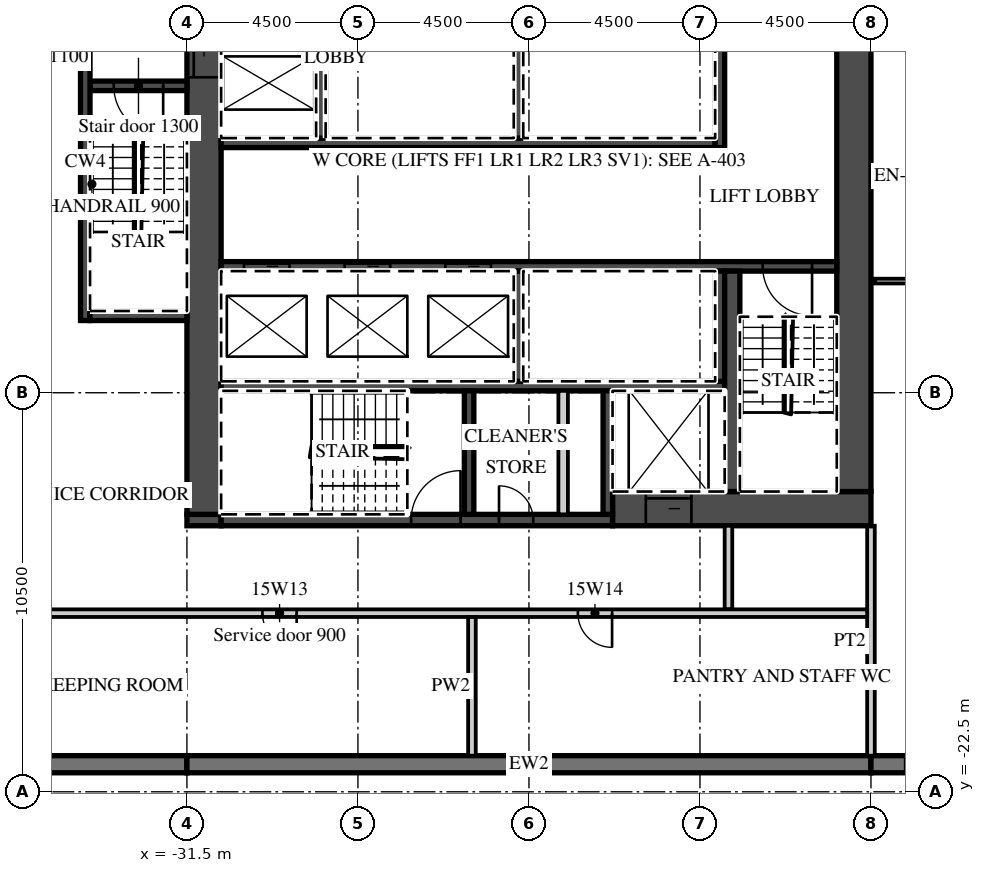
"""IFC4 building model, lengths in metres.
Left out: names, types, materials, properties, quantities, classifications, styles, units other than length and angle.
Written with IfcOpenShell. Run it as: python <this file> out.ifc"""

import sys

from ifc_helpers import new_model, si_unit, direction, frame, frame_2d, origin, place, context, subcontext, project, spatial, rectangle, extrude, element, fill, save


model = new_model("IFC4")
c1 = context("Model", 3, precision=1e-05, world=origin(), true_north=direction((0.0, 1.0)))
c2 = subcontext(c1, "Body", "Model", "MODEL_VIEW")
j1 = project(units=[si_unit("LENGTHUNIT", "METRE"), si_unit("PLANEANGLEUNIT", "RADIAN")], contexts=[c1])
p1 = place(None, origin())
s1 = spatial("IfcSite", under=j1, at=p1, CompositionType="ELEMENT")
p2 = place(p1, origin())
s2 = spatial("IfcBuilding", under=s1, at=p2, CompositionType="ELEMENT")
p3 = place(p2, frame((0.0, 0.0, 79.8)))
s3 = spatial("IfcBuildingStorey", under=s2, at=p3, CompositionType="ELEMENT", Elevation=79.8)
p4 = place(p3, frame((-41.0, -21.775, 0.0), z_axis=(0.0, 0.0, 1.0), x_axis=(1.0, 0.0, 0.0)))
e1 = element("IfcWall", 1, at=p4, inside=s3, PredefinedType="SOLIDWALL", context=c2, shape_type="SweptSolid", body=[
    extrude(rectangle(XDim=9.5, YDim=0.45, at=frame_2d((4.75, 0.0))), origin(), (0.0, 0.0, 1.0), 3.02),
])
p5 = place(p3, frame((-31.5, -21.775, 0.0), z_axis=(0.0, 0.0, 1.0), x_axis=(1.0, 0.0, 0.0)))
e2 = element("IfcWall", 2, at=p5, inside=s3, PredefinedType="SOLIDWALL", context=c2, shape_type="SweptSolid", body=[
    extrude(rectangle(XDim=18.0, YDim=0.45, at=frame_2d((9.0, 0.0))), origin(), (0.0, 0.0, 1.0), 3.02),
])
p6 = place(p3, frame((-13.5, -21.775, 0.0), z_axis=(0.0, 0.0, 1.0), x_axis=(1.0, 0.0, 0.0)))
e3 = element("IfcWall", 3, at=p6, inside=s3, PredefinedType="SOLIDWALL", context=c2, shape_type="SweptSolid", body=[
    extrude(rectangle(XDim=54.5, YDim=0.45, at=frame_2d((27.25, 0.0))), origin(), (0.0, 0.0, 1.0), 3.02),
])
p7 = place(p6, frame((0.9, 0.0, 0.45)))
e4 = element("IfcOpeningElement", 4, at=p7, cuts=e3, PredefinedType="OPENING", context=c2, shape_type="SweptSolid", body=[
    extrude(rectangle(XDim=2.7, YDim=2.25, at=frame_2d((1.35, 1.125))), frame((0.0, 0.235, 0.0), z_axis=(0.0, -1.0, 0.0), x_axis=(1.0, 0.0, 0.0)), (0.0, 0.0, 1.0), 0.47),
])
p8 = place(p6, frame((5.4, 0.0, 0.45)))
e5 = element("IfcOpeningElement", 5, at=p8, cuts=e3, PredefinedType="OPENING", context=c2, shape_type="SweptSolid", body=[
    extrude(rectangle(XDim=2.7, YDim=2.25, at=frame_2d((1.35, 1.125))), frame((0.0, 0.235, 0.0), z_axis=(0.0, -1.0, 0.0), x_axis=(1.0, 0.0, 0.0)), (0.0, 0.0, 1.0), 0.47),
])
p9 = place(p6, frame((9.9, 0.0, 0.45)))
e6 = element("IfcOpeningElement", 6, at=p9, cuts=e3, PredefinedType="OPENING", context=c2, shape_type="SweptSolid", body=[
    extrude(rectangle(XDim=2.7, YDim=2.25, at=frame_2d((1.35, 1.125))), frame((0.0, 0.235, 0.0), z_axis=(0.0, -1.0, 0.0), x_axis=(1.0, 0.0, 0.0)), (0.0, 0.0, 1.0), 0.47),
])
p10 = place(p6, frame((14.4, 0.0, 0.45)))
e7 = element("IfcOpeningElement", 7, at=p10, cuts=e3, PredefinedType="OPENING", context=c2, shape_type="SweptSolid", body=[
    extrude(rectangle(XDim=2.7, YDim=2.25, at=frame_2d((1.35, 1.125))), frame((0.0, 0.235, 0.0), z_axis=(0.0, -1.0, 0.0), x_axis=(1.0, 0.0, 0.0)), (0.0, 0.0, 1.0), 0.47),
])
p11 = place(p6, frame((18.9, 0.0, 0.45)))
e8 = element("IfcOpeningElement", 8, at=p11, cuts=e3, PredefinedType="OPENING", context=c2, shape_type="SweptSolid", body=[
    extrude(rectangle(XDim=2.7, YDim=2.25, at=frame_2d((1.35, 1.125))), frame((0.0, 0.235, 0.0), z_axis=(0.0, -1.0, 0.0), x_axis=(1.0, 0.0, 0.0)), (0.0, 0.0, 1.0), 0.47),
])
p12 = place(p6, frame((23.4, 0.0, 0.45)))
e9 = element("IfcOpeningElement", 9, at=p12, cuts=e3, PredefinedType="OPENING", context=c2, shape_type="SweptSolid", body=[
    extrude(rectangle(XDim=2.7, YDim=2.25, at=frame_2d((1.35, 1.125))), frame((0.0, 0.235, 0.0), z_axis=(0.0, -1.0, 0.0), x_axis=(1.0, 0.0, 0.0)), (0.0, 0.0, 1.0), 0.47),
])
p13 = place(p6, frame((27.9, 0.0, 0.45)))
e10 = element("IfcOpeningElement", 10, at=p13, cuts=e3, PredefinedType="OPENING", context=c2, shape_type="SweptSolid", body=[
    extrude(rectangle(XDim=2.7, YDim=2.25, at=frame_2d((1.35, 1.125))), frame((0.0, 0.235, 0.0), z_axis=(0.0, -1.0, 0.0), x_axis=(1.0, 0.0, 0.0)), (0.0, 0.0, 1.0), 0.47),
])
p14 = place(p6, frame((32.4, 0.0, 0.45)))
e11 = element("IfcOpeningElement", 11, at=p14, cuts=e3, PredefinedType="OPENING", context=c2, shape_type="SweptSolid", body=[
    extrude(rectangle(XDim=2.7, YDim=2.25, at=frame_2d((1.35, 1.125))), frame((0.0, 0.235, 0.0), z_axis=(0.0, -1.0, 0.0), x_axis=(1.0, 0.0, 0.0)), (0.0, 0.0, 1.0), 0.47),
])
p15 = place(p6, frame((36.9, 0.0, 0.45)))
e12 = element("IfcOpeningElement", 12, at=p15, cuts=e3, PredefinedType="OPENING", context=c2, shape_type="SweptSolid", body=[
    extrude(rectangle(XDim=2.7, YDim=2.25, at=frame_2d((1.35, 1.125))), frame((0.0, 0.235, 0.0), z_axis=(0.0, -1.0, 0.0), x_axis=(1.0, 0.0, 0.0)), (0.0, 0.0, 1.0), 0.47),
])
p16 = place(p6, frame((41.4, 0.0, 0.45)))
e13 = element("IfcOpeningElement", 13, at=p16, cuts=e3, PredefinedType="OPENING", context=c2, shape_type="SweptSolid", body=[
    extrude(rectangle(XDim=2.7, YDim=2.25, at=frame_2d((1.35, 1.125))), frame((0.0, 0.235, 0.0), z_axis=(0.0, -1.0, 0.0), x_axis=(1.0, 0.0, 0.0)), (0.0, 0.0, 1.0), 0.47),
])
p17 = place(p6, frame((45.9, 0.0, 0.45)))
e14 = element("IfcOpeningElement", 14, at=p17, cuts=e3, PredefinedType="OPENING", context=c2, shape_type="SweptSolid", body=[
    extrude(rectangle(XDim=2.7, YDim=2.25, at=frame_2d((1.35, 1.125))), frame((0.0, 0.235, 0.0), z_axis=(0.0, -1.0, 0.0), x_axis=(1.0, 0.0, 0.0)), (0.0, 0.0, 1.0), 0.47),
])
p18 = place(p6, frame((50.4, 0.0, 0.45)))
e15 = element("IfcOpeningElement", 15, at=p18, cuts=e3, PredefinedType="OPENING", context=c2, shape_type="SweptSolid", body=[
    extrude(rectangle(XDim=2.7, YDim=2.25, at=frame_2d((1.35, 1.125))), frame((0.0, 0.235, 0.0), z_axis=(0.0, -1.0, 0.0), x_axis=(1.0, 0.0, 0.0)), (0.0, 0.0, 1.0), 0.47),
])
p19 = place(p3, frame((-13.5, -21.55, 0.0), z_axis=(0.0, 0.0, 1.0), x_axis=(0.0, 1.0, 0.0)))
e16 = element("IfcWall", 16, at=p19, inside=s3, PredefinedType="PARTITIONING", context=c2, shape_type="SweptSolid", body=[
    extrude(rectangle(XDim=6.05, YDim=0.2, at=frame_2d((3.025, 0.0))), origin(), (0.0, 0.0, 1.0), 3.02),
])
p20 = place(p3, frame((-13.4, -9.062, 0.0), z_axis=(0.0, 0.0, 1.0), x_axis=(1.0, 0.0, 0.0)))
e17 = element("IfcWall", 17, at=p20, inside=s3, PredefinedType="PARTITIONING", context=c2, shape_type="SweptSolid", body=[
    extrude(rectangle(XDim=2.25, YDim=0.125, at=frame_2d((1.125, 0.0))), origin(), (0.0, 0.0, 1.0), 3.02),
])
p21 = place(p3, frame((-20.3, -15.05, 0.0), z_axis=(0.0, 0.0, 1.0), x_axis=(1.0, 0.0, 0.0)))
e18 = element("IfcWall", 18, at=p21, inside=s3, PredefinedType="SHEAR", context=c2, shape_type="SweptSolid", body=[
    extrude(rectangle(XDim=6.8, YDim=0.9, at=frame_2d((3.4, 0.0))), origin(), (0.0, 0.0, 1.0), 3.02),
])
p22 = place(p21, frame((0.875, 0.0, 0.0)))
e19 = element("IfcOpeningElement", 19, at=p22, cuts=e18, PredefinedType="OPENING", context=c2, shape_type="SweptSolid", body=[
    extrude(rectangle(XDim=1.2, YDim=2.1, at=frame_2d((0.6, 1.05))), frame((0.0, 0.46, 0.0), z_axis=(0.0, -1.0, 0.0), x_axis=(1.0, 0.0, 0.0)), (0.0, 0.0, 1.0), 0.92),
])
p23 = place(p3, frame((-31.5, -15.35, 0.0), z_axis=(0.0, 0.0, 1.0), x_axis=(1.0, 0.0, 0.0)))
e20 = element("IfcWall", 20, at=p23, inside=s3, PredefinedType="SHEAR", context=c2, shape_type="SweptSolid", body=[
    extrude(rectangle(XDim=0.9, YDim=0.3, at=frame_2d((0.45, 0.0))), origin(), (0.0, 0.0, 1.0), 3.02),
])
p24 = place(p3, frame((-30.6, -15.35, 0.0), z_axis=(0.0, 0.0, 1.0), x_axis=(1.0, 0.0, 0.0)))
e21 = element("IfcWall", 21, at=p24, inside=s3, PredefinedType="SHEAR", context=c2, shape_type="SweptSolid", body=[
    extrude(rectangle(XDim=10.3, YDim=0.3, at=frame_2d((5.15, 0.0))), origin(), (0.0, 0.0, 1.0), 3.02),
])
p25 = place(p24, frame((5.0, 0.0, 0.0)))
e22 = element("IfcOpeningElement", 22, at=p25, cuts=e21, PredefinedType="OPENING", context=c2, shape_type="SweptSolid", body=[
    extrude(rectangle(XDim=1.3, YDim=2.1, at=frame_2d((0.65, 1.05))), frame((0.0, 0.16, 0.0), z_axis=(0.0, -1.0, 0.0), x_axis=(1.0, 0.0, 0.0)), (0.0, 0.0, 1.0), 0.32),
])
p26 = place(p24, frame((7.312, 0.0, 0.0)))
e23 = element("IfcOpeningElement", 23, at=p26, cuts=e21, PredefinedType="OPENING", context=c2, shape_type="SweptSolid", body=[
    extrude(rectangle(XDim=0.9, YDim=2.1, at=frame_2d((0.45, 1.05))), frame((0.0, 0.16, 0.0), z_axis=(0.0, -1.0, 0.0), x_axis=(1.0, 0.0, 0.0)), (0.0, 0.0, 1.0), 0.32),
])
p27 = place(p3, frame((-31.05, -15.2, 0.0), z_axis=(0.0, 0.0, 1.0), x_axis=(0.0, 1.0, 0.0)))
e24 = element("IfcWall", 24, at=p27, inside=s3, PredefinedType="SHEAR", context=c2, shape_type="SweptSolid", body=[
    extrude(rectangle(XDim=12.8, YDim=0.9, at=frame_2d((6.4, 0.0))), origin(), (0.0, 0.0, 1.0), 3.02),
])
p28 = place(p27, frame((11.5, 0.0, 0.0)))
e25 = element("IfcOpeningElement", 25, at=p28, cuts=e24, PredefinedType="OPENING", context=c2, shape_type="SweptSolid", body=[
    extrude(rectangle(XDim=1.1, YDim=2.1, at=frame_2d((0.55, 1.05))), frame((0.0, 0.46, 0.0), z_axis=(0.0, -1.0, 0.0), x_axis=(1.0, 0.0, 0.0)), (0.0, 0.0, 1.0), 0.92),
])
p29 = place(p3, frame((-13.95, -14.6, 0.0), z_axis=(0.0, 0.0, 1.0), x_axis=(0.0, 1.0, 0.0)))
e26 = element("IfcWall", 26, at=p29, inside=s3, PredefinedType="SHEAR", context=c2, shape_type="SweptSolid", body=[
    extrude(rectangle(XDim=12.2, YDim=0.9, at=frame_2d((6.1, 0.0))), origin(), (0.0, 0.0, 1.0), 3.02),
])
p30 = place(p3, frame((-30.6, -5.425, 0.0), z_axis=(0.0, 0.0, 1.0), x_axis=(1.0, 0.0, 0.0)))
e27 = element("IfcWall", 27, at=p30, inside=s3, PredefinedType="SHEAR", context=c2, shape_type="SweptSolid", body=[
    extrude(rectangle(XDim=13.0, YDim=0.25, at=frame_2d((6.5, 0.0))), origin(), (0.0, 0.0, 1.0), 3.02),
])
p31 = place(p3, frame((-17.475, -5.55, 0.0), z_axis=(0.0, 0.0, 1.0), x_axis=(0.0, 1.0, 0.0)))
e28 = element("IfcWall", 28, at=p31, inside=s3, PredefinedType="SHEAR", context=c2, shape_type="SweptSolid", body=[
    extrude(rectangle(XDim=3.15, YDim=0.25, at=frame_2d((1.575, 0.0))), origin(), (0.0, 0.0, 1.0), 3.02),
])
for number, where, z_axis, x_axis in (
    (29, (-27.975, -5.3, 0.0), (0.0, 0.0, 1.0), (0.0, 1.0, 0.0)),
    (30, (-22.775, -5.3, 0.0), (0.0, 0.0, 1.0), (0.0, 1.0, 0.0)),
):
    element("IfcWall", number, at=place(p3, frame(where, z_axis=z_axis, x_axis=x_axis)), inside=s3, PredefinedType="SHEAR", context=c2, shape_type="SweptSolid", body=[
        extrude(rectangle(XDim=2.9, YDim=0.25, at=frame_2d((1.45, 0.0))), origin(), (0.0, 0.0, 1.0), 3.02),
    ])
p32 = place(p3, frame((-30.6, -8.675, 0.0), z_axis=(0.0, 0.0, 1.0), x_axis=(1.0, 0.0, 0.0)))
e31 = element("IfcWall", 31, at=p32, inside=s3, PredefinedType="SHEAR", context=c2, shape_type="SweptSolid", body=[
    extrude(rectangle(XDim=16.2, YDim=0.25, at=frame_2d((8.1, 0.0))), origin(), (0.0, 0.0, 1.0), 3.02),
])
p33 = place(p32, frame((0.6, 0.0, 0.0)))
e32 = element("IfcOpeningElement", 32, at=p33, cuts=e31, PredefinedType="OPENING", context=c2, shape_type="SweptSolid", body=[
    extrude(rectangle(XDim=1.2, YDim=2.1, at=frame_2d((0.6, 1.05))), frame((0.0, 0.135, 0.0), z_axis=(0.0, -1.0, 0.0), x_axis=(1.0, 0.0, 0.0)), (0.0, 0.0, 1.0), 0.27),
])
p34 = place(p32, frame((3.25, 0.0, 0.0)))
e33 = element("IfcOpeningElement", 33, at=p34, cuts=e31, PredefinedType="OPENING", context=c2, shape_type="SweptSolid", body=[
    extrude(rectangle(XDim=1.2, YDim=2.1, at=frame_2d((0.6, 1.05))), frame((0.0, 0.135, 0.0), z_axis=(0.0, -1.0, 0.0), x_axis=(1.0, 0.0, 0.0)), (0.0, 0.0, 1.0), 0.27),
])
p35 = place(p32, frame((5.9, 0.0, 0.0)))
e34 = element("IfcOpeningElement", 34, at=p35, cuts=e31, PredefinedType="OPENING", context=c2, shape_type="SweptSolid", body=[
    extrude(rectangle(XDim=1.2, YDim=2.1, at=frame_2d((0.6, 1.05))), frame((0.0, 0.135, 0.0), z_axis=(0.0, -1.0, 0.0), x_axis=(1.0, 0.0, 0.0)), (0.0, 0.0, 1.0), 0.27),
])
p36 = place(p32, frame((14.25, 0.0, 0.0)))
e35 = element("IfcOpeningElement", 35, at=p36, cuts=e31, PredefinedType="OPENING", context=c2, shape_type="SweptSolid", body=[
    extrude(rectangle(XDim=1.3, YDim=2.1, at=frame_2d((0.65, 1.05))), frame((0.0, 0.135, 0.0), z_axis=(0.0, -1.0, 0.0), x_axis=(1.0, 0.0, 0.0)), (0.0, 0.0, 1.0), 0.27),
])
p37 = place(p3, frame((-30.6, -11.825, 0.0), z_axis=(0.0, 0.0, 1.0), x_axis=(1.0, 0.0, 0.0)))
e36 = element("IfcWall", 36, at=p37, inside=s3, PredefinedType="SHEAR", context=c2, shape_type="SweptSolid", body=[
    extrude(rectangle(XDim=13.25, YDim=0.25, at=frame_2d((6.625, 0.0))), origin(), (0.0, 0.0, 1.0), 3.02),
])
for number, where, z_axis, x_axis in (
    (37, (-17.475, -11.7, 0.0), (0.0, 0.0, 1.0), (0.0, 1.0, 0.0)),
    (38, (-22.775, -11.7, 0.0), (0.0, 0.0, 1.0), (0.0, 1.0, 0.0)),
):
    element("IfcWall", number, at=place(p3, frame(where, z_axis=z_axis, x_axis=x_axis)), inside=s3, PredefinedType="SHEAR", context=c2, shape_type="SweptSolid", body=[
        extrude(rectangle(XDim=2.9, YDim=0.25, at=frame_2d((1.45, 0.0))), origin(), (0.0, 0.0, 1.0), 3.02),
    ])
p38 = place(p3, frame((-17.15, -14.6, 0.0), z_axis=(0.0, 0.0, 1.0), x_axis=(0.0, 1.0, 0.0)))
e39 = element("IfcWall", 39, at=p38, inside=s3, PredefinedType="SHEAR", context=c2, shape_type="SweptSolid", body=[
    extrude(rectangle(XDim=5.8, YDim=0.4, at=frame_2d((2.9, 0.0))), origin(), (0.0, 0.0, 1.0), 3.02),
])
for number, where, z_axis, x_axis in (
    (40, (-20.425, -15.2, 0.0), (0.0, 0.0, 1.0), (0.0, 1.0, 0.0)),
    (41, (-24.075, -15.2, 0.0), (0.0, 0.0, 1.0), (0.0, 1.0, 0.0)),
):
    element("IfcWall", number, at=place(p3, frame(where, z_axis=z_axis, x_axis=x_axis)), inside=s3, PredefinedType="SHEAR", context=c2, shape_type="SweptSolid", body=[
        extrude(rectangle(XDim=3.25, YDim=0.25, at=frame_2d((1.625, 0.0))), origin(), (0.0, 0.0, 1.0), 3.02),
    ])
p39 = place(p3, frame((-21.6, -15.2, 0.0), z_axis=(0.0, 0.0, 1.0), x_axis=(0.0, 1.0, 0.0)))
e42 = element("IfcWall", 42, at=p39, inside=s3, PredefinedType="PARTITIONING", context=c2, shape_type="SweptSolid", body=[
    extrude(rectangle(XDim=3.25, YDim=0.25, at=frame_2d((1.625, 0.0))), origin(), (0.0, 0.0, 1.0), 3.02),
])
p40 = place(p3, frame((-34.05, -3.925, 0.0), z_axis=(0.0, 0.0, 1.0), x_axis=(1.0, 0.0, 0.0)))
e43 = element("IfcWall", 43, at=p40, inside=s3, PredefinedType="SHEAR", context=c2, shape_type="SweptSolid", body=[
    extrude(rectangle(XDim=2.55, YDim=0.25, at=frame_2d((1.275, 0.0))), origin(), (0.0, 0.0, 1.0), 3.02),
])
p41 = place(p40, frame((0.625, 0.0, 0.0)))
e44 = element("IfcOpeningElement", 44, at=p41, cuts=e43, PredefinedType="OPENING", context=c2, shape_type="SweptSolid", body=[
    extrude(rectangle(XDim=1.3, YDim=2.1, at=frame_2d((0.65, 1.05))), frame((0.0, 0.135, 0.0), z_axis=(0.0, -1.0, 0.0), x_axis=(1.0, 0.0, 0.0)), (0.0, 0.0, 1.0), 0.27),
])
p42 = place(p3, frame((-34.175, -10.1, 0.0), z_axis=(0.0, 0.0, 1.0), x_axis=(0.0, 1.0, 0.0)))
e45 = element("IfcWall", 45, at=p42, inside=s3, PredefinedType="SHEAR", context=c2, shape_type="SweptSolid", body=[
    extrude(rectangle(XDim=8.35, YDim=0.25, at=frame_2d((4.175, 0.0))), origin(), (0.0, 0.0, 1.0), 3.02),
])
p43 = place(p3, frame((-34.05, -9.975, 0.0), z_axis=(0.0, 0.0, 1.0), x_axis=(1.0, 0.0, 0.0)))
e46 = element("IfcWall", 46, at=p43, inside=s3, PredefinedType="SHEAR", context=c2, shape_type="SweptSolid", body=[
    extrude(rectangle(XDim=2.55, YDim=0.25, at=frame_2d((1.275, 0.0))), origin(), (0.0, 0.0, 1.0), 3.02),
])
p44 = place(p3, frame((-17.25, -17.7, 0.0), z_axis=(0.0, 0.0, 1.0), x_axis=(0.0, 1.0, 0.0)))
e47 = element("IfcWall", 47, at=p44, inside=s3, PredefinedType="PARTITIONING", context=c2, shape_type="SweptSolid", body=[
    extrude(rectangle(XDim=2.2, YDim=0.2, at=frame_2d((1.1, 0.0))), origin(), (0.0, 0.0, 1.0), 3.02),
])
p45 = place(p3, frame((-44.55, -17.8, 0.0), z_axis=(0.0, 0.0, 1.0), x_axis=(1.0, 0.0, 0.0)))
e48 = element("IfcWall", 48, at=p45, inside=s3, PredefinedType="PARTITIONING", context=c2, shape_type="SweptSolid", body=[
    extrude(rectangle(XDim=30.95, YDim=0.2, at=frame_2d((15.475, 0.0))), origin(), (0.0, 0.0, 1.0), 3.02),
])
p46 = place(p45, frame((15.038, 0.0, 0.0)))
e49 = element("IfcOpeningElement", 49, at=p46, cuts=e48, PredefinedType="OPENING", context=c2, shape_type="SweptSolid", body=[
    extrude(rectangle(XDim=0.9, YDim=2.1, at=frame_2d((0.45, 1.05))), frame((0.0, 0.11, 0.0), z_axis=(0.0, -1.0, 0.0), x_axis=(1.0, 0.0, 0.0)), (0.0, 0.0, 1.0), 0.22),
])
p47 = place(p45, frame((23.337, 0.0, 0.0)))
e50 = element("IfcOpeningElement", 50, at=p47, cuts=e48, PredefinedType="OPENING", context=c2, shape_type="SweptSolid", body=[
    extrude(rectangle(XDim=0.9, YDim=2.1, at=frame_2d((0.45, 1.05))), frame((0.0, 0.11, 0.0), z_axis=(0.0, -1.0, 0.0), x_axis=(1.0, 0.0, 0.0)), (0.0, 0.0, 1.0), 0.22),
])
p48 = place(p3, frame((-24.0, -21.55, 0.0), z_axis=(0.0, 0.0, 1.0), x_axis=(0.0, 1.0, 0.0)))
e51 = element("IfcWall", 51, at=p48, inside=s3, PredefinedType="PARTITIONING", context=c2, shape_type="SweptSolid", body=[
    extrude(rectangle(XDim=3.65, YDim=0.2, at=frame_2d((1.825, 0.0))), origin(), (0.0, 0.0, 1.0), 3.02),
])
p49 = place(p33, origin())
e52 = element("IfcDoor", 52, at=p49, inside=s3, OperationType="SLIDING_TO_LEFT", PredefinedType="DOOR", context=c2, shape_type="SweptSolid", body=[
    extrude(rectangle(XDim=1.2, YDim=2.1, at=frame_2d((0.6, 1.05))), frame((0.0, 0.025, 0.0), z_axis=(0.0, -1.0, 0.0), x_axis=(1.0, 0.0, 0.0)), (0.0, 0.0, 1.0), 0.05),
])
fill(e32, e52)
p50 = place(p34, origin())
e53 = element("IfcDoor", 53, at=p50, inside=s3, OperationType="SLIDING_TO_RIGHT", PredefinedType="DOOR", context=c2, shape_type="SweptSolid", body=[
    extrude(rectangle(XDim=1.2, YDim=2.1, at=frame_2d((0.6, 1.05))), frame((0.0, 0.025, 0.0), z_axis=(0.0, -1.0, 0.0), x_axis=(1.0, 0.0, 0.0)), (0.0, 0.0, 1.0), 0.05),
])
fill(e33, e53)
p51 = place(p35, origin())
e54 = element("IfcDoor", 54, at=p51, inside=s3, OperationType="SLIDING_TO_RIGHT", PredefinedType="DOOR", context=c2, shape_type="SweptSolid", body=[
    extrude(rectangle(XDim=1.2, YDim=2.1, at=frame_2d((0.6, 1.05))), frame((0.0, 0.025, 0.0), z_axis=(0.0, -1.0, 0.0), x_axis=(1.0, 0.0, 0.0)), (0.0, 0.0, 1.0), 0.05),
])
fill(e34, e54)
p52 = place(p22, origin())
e55 = element("IfcDoor", 55, at=p52, inside=s3, OperationType="SLIDING_TO_LEFT", PredefinedType="DOOR", context=c2, shape_type="SweptSolid", body=[
    extrude(rectangle(XDim=1.2, YDim=2.1, at=frame_2d((0.6, 1.05))), frame((0.0, 0.025, 0.0), z_axis=(0.0, -1.0, 0.0), x_axis=(1.0, 0.0, 0.0)), (0.0, 0.0, 1.0), 0.05),
])
fill(e19, e55)
p53 = place(p28, origin())
e56 = element("IfcDoor", 56, at=p53, inside=s3, OperationType="SLIDING_TO_RIGHT", PredefinedType="DOOR", context=c2, shape_type="SweptSolid", body=[
    extrude(rectangle(XDim=1.1, YDim=2.1, at=frame_2d((0.55, 1.05))), frame((0.0, 0.025, 0.0), z_axis=(0.0, -1.0, 0.0), x_axis=(1.0, 0.0, 0.0)), (0.0, 0.0, 1.0), 0.05),
])
fill(e25, e56)
p54 = place(p41, origin())
e57 = element("IfcDoor", 57, at=p54, inside=s3, OperationType="SINGLE_SWING_RIGHT", PredefinedType="DOOR", context=c2, shape_type="SweptSolid", body=[
    extrude(rectangle(XDim=1.3, YDim=2.1, at=frame_2d((0.65, 1.05))), frame((0.0, 0.025, 0.0), z_axis=(0.0, -1.0, 0.0), x_axis=(1.0, 0.0, 0.0)), (0.0, 0.0, 1.0), 0.05),
])
fill(e44, e57)
p55 = place(p36, origin())
e58 = element("IfcDoor", 58, at=p55, inside=s3, OperationType="SINGLE_SWING_RIGHT", PredefinedType="DOOR", context=c2, shape_type="SweptSolid", body=[
    extrude(rectangle(XDim=1.3, YDim=2.1, at=frame_2d((0.65, 1.05))), frame((0.0, 0.025, 0.0), z_axis=(0.0, -1.0, 0.0), x_axis=(1.0, 0.0, 0.0)), (0.0, 0.0, 1.0), 0.05),
])
fill(e35, e58)
p56 = place(p25, origin())
e59 = element("IfcDoor", 59, at=p56, inside=s3, OperationType="SINGLE_SWING_RIGHT", PredefinedType="DOOR", context=c2, shape_type="SweptSolid", body=[
    extrude(rectangle(XDim=1.3, YDim=2.1, at=frame_2d((0.65, 1.05))), frame((0.0, 0.025, 0.0), z_axis=(0.0, -1.0, 0.0), x_axis=(1.0, 0.0, 0.0)), (0.0, 0.0, 1.0), 0.05),
])
fill(e22, e59)
p57 = place(p26, origin())
e60 = element("IfcDoor", 60, at=p57, inside=s3, OperationType="SINGLE_SWING_LEFT", PredefinedType="DOOR", context=c2, shape_type="SweptSolid", body=[
    extrude(rectangle(XDim=0.9, YDim=2.1, at=frame_2d((0.45, 1.05))), frame((0.0, 0.025, 0.0), z_axis=(0.0, -1.0, 0.0), x_axis=(1.0, 0.0, 0.0)), (0.0, 0.0, 1.0), 0.05),
])
fill(e23, e60)
p58 = place(p46, origin())
e61 = element("IfcDoor", 61, at=p58, inside=s3, OperationType="SINGLE_SWING_RIGHT", PredefinedType="DOOR", context=c2, shape_type="SweptSolid", body=[
    extrude(rectangle(XDim=0.9, YDim=2.1, at=frame_2d((0.45, 1.05))), frame((0.0, 0.025, 0.0), z_axis=(0.0, -1.0, 0.0), x_axis=(1.0, 0.0, 0.0)), (0.0, 0.0, 1.0), 0.05),
])
fill(e49, e61)
p59 = place(p47, origin())
e62 = element("IfcDoor", 62, at=p59, inside=s3, OperationType="SINGLE_SWING_RIGHT", PredefinedType="DOOR", context=c2, shape_type="SweptSolid", body=[
    extrude(rectangle(XDim=0.9, YDim=2.1, at=frame_2d((0.45, 1.05))), frame((0.0, 0.025, 0.0), z_axis=(0.0, -1.0, 0.0), x_axis=(1.0, 0.0, 0.0)), (0.0, 0.0, 1.0), 0.05),
])
fill(e50, e62)
save(model, sys.argv[1])
